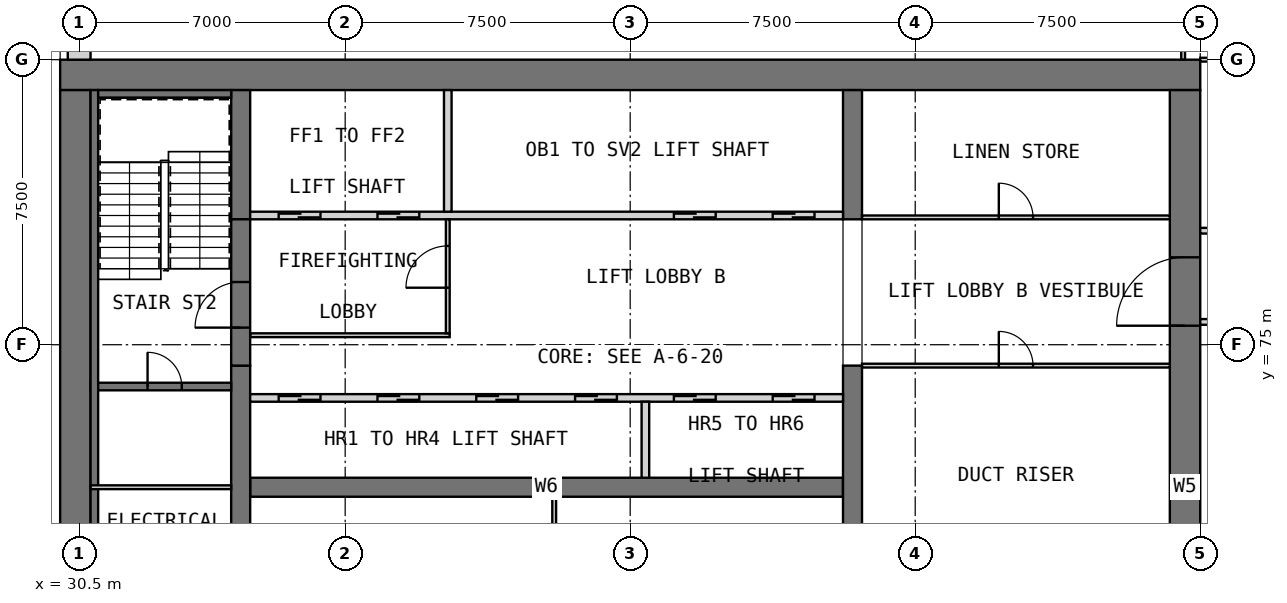
"""IFC4 building model, lengths in metres.
Left out: names, types, materials, properties, quantities, classifications, styles, units other than length and angle.
Written with IfcOpenShell. Run it as: python <this file> out.ifc"""

import sys

from ifc_helpers import new_model, si_unit, direction, frame, frame_2d, origin, place, context, subcontext, project, spatial, rectangle, extrude, element, fill, save


model = new_model("IFC4")
c1 = context("Model", 3, precision=1e-05, world=origin(), true_north=direction((0.0, 1.0)))
c2 = subcontext(c1, "Body", "Model", "MODEL_VIEW")
j1 = project(units=[si_unit("LENGTHUNIT", "METRE"), si_unit("PLANEANGLEUNIT", "RADIAN")], contexts=[c1])
p1 = place(None, origin())
s1 = spatial("IfcSite", under=j1, at=p1, CompositionType="ELEMENT")
p2 = place(p1, origin())
s2 = spatial("IfcBuilding", under=s1, at=p2, CompositionType="ELEMENT")
p3 = place(p2, frame((0.0, 0.0, 141.0)))
s3 = spatial("IfcBuildingStorey", under=s2, at=p3, CompositionType="ELEMENT", Elevation=141.0)
p4 = place(p3, frame((30.0, 82.1, 0.0), z_axis=(0.0, 0.0, 1.0), x_axis=(1.0, 0.0, 0.0)))
e1 = element("IfcWall", 1, at=p4, inside=s3, PredefinedType="SHEAR", context=c2, shape_type="SweptSolid", body=[
    extrude(rectangle(XDim=30.0, YDim=0.8, at=frame_2d((15.0, 0.0))), origin(), (0.0, 0.0, 1.0), 3.6),
])
p5 = place(p3, frame((30.4, 60.8, 0.0), z_axis=(0.0, 0.0, 1.0), x_axis=(0.0, 1.0, 0.0)))
e2 = element("IfcWall", 2, at=p5, inside=s3, PredefinedType="SHEAR", context=c2, shape_type="SweptSolid", body=[
    extrude(rectangle(XDim=20.9, YDim=0.8, at=frame_2d((10.45, 0.0))), origin(), (0.0, 0.0, 1.0), 3.6),
])
p6 = place(p3, frame((59.6, 60.8, 0.0), z_axis=(0.0, 0.0, 1.0), x_axis=(0.0, 1.0, 0.0)))
e3 = element("IfcWall", 3, at=p6, inside=s3, PredefinedType="SHEAR", context=c2, shape_type="SweptSolid", body=[
    extrude(rectangle(XDim=20.9, YDim=0.8, at=frame_2d((10.45, 0.0))), origin(), (0.0, 0.0, 1.0), 3.6),
])
p7 = place(p6, frame((14.7, 0.0, 0.0)))
e4 = element("IfcOpeningElement", 4, at=p7, cuts=e3, PredefinedType="OPENING", context=c2, shape_type="SweptSolid", body=[
    extrude(rectangle(XDim=1.8, YDim=2.1, at=frame_2d((0.9, 1.05))), frame((0.0, 0.41, 0.0), z_axis=(0.0, -1.0, 0.0), x_axis=(1.0, 0.0, 0.0)), (0.0, 0.0, 1.0), 0.82),
])
p8 = place(p3, frame((35.0, 71.25, 0.0), z_axis=(0.0, 0.0, 1.0), x_axis=(1.0, 0.0, 0.0)))
e5 = element("IfcWall", 5, at=p8, inside=s3, PredefinedType="SHEAR", context=c2, shape_type="SweptSolid", body=[
    extrude(rectangle(XDim=15.6, YDim=0.5, at=frame_2d((7.8, 0.0))), origin(), (0.0, 0.0, 1.0), 3.6),
])
p9 = place(p3, frame((34.75, 68.05, 0.0), z_axis=(0.0, 0.0, 1.0), x_axis=(0.0, 1.0, 0.0)))
e6 = element("IfcWall", 6, at=p9, inside=s3, PredefinedType="SHEAR", context=c2, shape_type="SweptSolid", body=[
    extrude(rectangle(XDim=6.4, YDim=0.5, at=frame_2d((3.2, 0.0))), origin(), (0.0, 0.0, 1.0), 3.6),
])
p10 = place(p3, frame((34.75, 78.3, 0.0), z_axis=(0.0, 0.0, 1.0), x_axis=(0.0, 1.0, 0.0)))
e7 = element("IfcWall", 7, at=p10, inside=s3, PredefinedType="SHEAR", context=c2, shape_type="SweptSolid", body=[
    extrude(rectangle(XDim=3.4, YDim=0.5, at=frame_2d((1.7, 0.0))), origin(), (0.0, 0.0, 1.0), 3.6),
])
p11 = place(p3, frame((50.85, 68.05, 0.0), z_axis=(0.0, 0.0, 1.0), x_axis=(0.0, 1.0, 0.0)))
e8 = element("IfcWall", 8, at=p11, inside=s3, PredefinedType="SHEAR", context=c2, shape_type="SweptSolid", body=[
    extrude(rectangle(XDim=6.4, YDim=0.5, at=frame_2d((3.2, 0.0))), origin(), (0.0, 0.0, 1.0), 3.6),
])
p12 = place(p3, frame((50.85, 78.3, 0.0), z_axis=(0.0, 0.0, 1.0), x_axis=(0.0, 1.0, 0.0)))
e9 = element("IfcWall", 9, at=p12, inside=s3, PredefinedType="SHEAR", context=c2, shape_type="SweptSolid", body=[
    extrude(rectangle(XDim=3.4, YDim=0.5, at=frame_2d((1.7, 0.0))), origin(), (0.0, 0.0, 1.0), 3.6),
])
p13 = place(p2, frame((0.0, 0.0, 34.0)))
s4 = spatial("IfcBuildingStorey", under=s2, at=p13, CompositionType="ELEMENT", Elevation=34.0)
for number, where, z_axis, x_axis in (
    (10, (29.7, 70.8, 0.0), (0.0, 0.0, 1.0), (0.0, 1.0, 0.0)),
    (11, (29.7, 75.675, 0.0), (0.0, 0.0, 1.0), (0.0, 1.0, 0.0)),
    (12, (29.7, 80.55, 0.0), (0.0, 0.0, 1.0), (0.0, 1.0, 0.0)),
):
    element("IfcWall", number, at=place(p13, frame(where, z_axis=z_axis, x_axis=x_axis)), inside=s4, PredefinedType="SOLIDWALL", context=c2, shape_type="SweptSolid", body=[
        extrude(rectangle(XDim=0.9, YDim=0.6, at=frame_2d((0.45, 0.0))), origin(), (0.0, 0.0, 1.0), 286.2),
    ])
p14 = place(p3, frame((30.5, 89.5, 0.0), z_axis=(0.0, 0.0, 1.0), x_axis=(0.0, -1.0, 0.0)))
e13 = element("IfcWall", 13, at=p14, inside=s3, PredefinedType="SOLIDWALL", context=c2, shape_type="SweptSolid", body=[
    extrude(rectangle(XDim=7.0, YDim=0.6, at=frame_2d((3.5, 0.0))), origin(), (0.0, 0.0, 1.0), 3.35),
])
p15 = place(p14, frame((3.925, 0.0, 0.8)))
e14 = element("IfcOpeningElement", 14, at=p15, cuts=e13, PredefinedType="OPENING", context=c2, shape_type="SweptSolid", body=[
    extrude(rectangle(XDim=2.4, YDim=1.8, at=frame_2d((1.2, 0.9))), frame((0.0, 0.31, 0.0), z_axis=(0.0, -1.0, 0.0), x_axis=(1.0, 0.0, 0.0)), (0.0, 0.0, 1.0), 0.62),
])
p16 = place(p14, frame((0.425, 0.0, 0.8)))
e15 = element("IfcOpeningElement", 15, at=p16, cuts=e13, PredefinedType="OPENING", context=c2, shape_type="SweptSolid", body=[
    extrude(rectangle(XDim=2.4, YDim=1.8, at=frame_2d((1.2, 0.9))), frame((0.0, 0.31, 0.0), z_axis=(0.0, -1.0, 0.0), x_axis=(1.0, 0.0, 0.0)), (0.0, 0.0, 1.0), 0.62),
])
p17 = place(p3, frame((43.0, 68.25, 0.0), z_axis=(0.0, 0.0, 1.0), x_axis=(0.0, 1.0, 0.0)))
e16 = element("IfcWall", 16, at=p17, inside=s3, PredefinedType="PARTITIONING", context=c2, shape_type="SweptSolid", body=[
    extrude(rectangle(XDim=2.75, YDim=0.1, at=frame_2d((1.375, 0.0))), origin(), (0.0, 0.0, 1.0), 3.35),
])
p18 = place(p3, frame((35.0, 73.6, 0.0), z_axis=(0.0, 0.0, 1.0), x_axis=(1.0, 0.0, 0.0)))
e17 = element("IfcWall", 17, at=p18, inside=s3, PredefinedType="SOLIDWALL", context=c2, shape_type="SweptSolid", body=[
    extrude(rectangle(XDim=15.6, YDim=0.2, at=frame_2d((7.8, 0.0))), origin(), (0.0, 0.0, 1.0), 3.6),
])
p19 = place(p18, frame((0.75, 0.0, 0.0)))
e18 = element("IfcOpeningElement", 18, at=p19, cuts=e17, PredefinedType="OPENING", context=c2, shape_type="SweptSolid", body=[
    extrude(rectangle(XDim=1.1, YDim=2.1, at=frame_2d((0.55, 1.05))), frame((0.0, 0.11, 0.0), z_axis=(0.0, -1.0, 0.0), x_axis=(1.0, 0.0, 0.0)), (0.0, 0.0, 1.0), 0.22),
])
p20 = place(p18, frame((3.35, 0.0, 0.0)))
e19 = element("IfcOpeningElement", 19, at=p20, cuts=e17, PredefinedType="OPENING", context=c2, shape_type="SweptSolid", body=[
    extrude(rectangle(XDim=1.1, YDim=2.1, at=frame_2d((0.55, 1.05))), frame((0.0, 0.11, 0.0), z_axis=(0.0, -1.0, 0.0), x_axis=(1.0, 0.0, 0.0)), (0.0, 0.0, 1.0), 0.22),
])
p21 = place(p18, frame((5.95, 0.0, 0.0)))
e20 = element("IfcOpeningElement", 20, at=p21, cuts=e17, PredefinedType="OPENING", context=c2, shape_type="SweptSolid", body=[
    extrude(rectangle(XDim=1.1, YDim=2.1, at=frame_2d((0.55, 1.05))), frame((0.0, 0.11, 0.0), z_axis=(0.0, -1.0, 0.0), x_axis=(1.0, 0.0, 0.0)), (0.0, 0.0, 1.0), 0.22),
])
p22 = place(p18, frame((8.55, 0.0, 0.0)))
e21 = element("IfcOpeningElement", 21, at=p22, cuts=e17, PredefinedType="OPENING", context=c2, shape_type="SweptSolid", body=[
    extrude(rectangle(XDim=1.1, YDim=2.1, at=frame_2d((0.55, 1.05))), frame((0.0, 0.11, 0.0), z_axis=(0.0, -1.0, 0.0), x_axis=(1.0, 0.0, 0.0)), (0.0, 0.0, 1.0), 0.22),
])
p23 = place(p18, frame((11.15, 0.0, 0.0)))
e22 = element("IfcOpeningElement", 22, at=p23, cuts=e17, PredefinedType="OPENING", context=c2, shape_type="SweptSolid", body=[
    extrude(rectangle(XDim=1.1, YDim=2.1, at=frame_2d((0.55, 1.05))), frame((0.0, 0.11, 0.0), z_axis=(0.0, -1.0, 0.0), x_axis=(1.0, 0.0, 0.0)), (0.0, 0.0, 1.0), 0.22),
])
p24 = place(p18, frame((13.75, 0.0, 0.0)))
e23 = element("IfcOpeningElement", 23, at=p24, cuts=e17, PredefinedType="OPENING", context=c2, shape_type="SweptSolid", body=[
    extrude(rectangle(XDim=1.1, YDim=2.1, at=frame_2d((0.55, 1.05))), frame((0.0, 0.11, 0.0), z_axis=(0.0, -1.0, 0.0), x_axis=(1.0, 0.0, 0.0)), (0.0, 0.0, 1.0), 0.22),
])
p25 = place(p3, frame((45.4, 71.5, 0.0), z_axis=(0.0, 0.0, 1.0), x_axis=(0.0, 1.0, 0.0)))
e24 = element("IfcWall", 24, at=p25, inside=s3, PredefinedType="SOLIDWALL", context=c2, shape_type="SweptSolid", body=[
    extrude(rectangle(XDim=2.0, YDim=0.2, at=frame_2d((1.0, 0.0))), origin(), (0.0, 0.0, 1.0), 3.6),
])
p26 = place(p3, frame((35.0, 78.4, 0.0), z_axis=(0.0, 0.0, 1.0), x_axis=(1.0, 0.0, 0.0)))
e25 = element("IfcWall", 25, at=p26, inside=s3, PredefinedType="SOLIDWALL", context=c2, shape_type="SweptSolid", body=[
    extrude(rectangle(XDim=15.6, YDim=0.2, at=frame_2d((7.8, 0.0))), origin(), (0.0, 0.0, 1.0), 3.6),
])
p27 = place(p26, frame((0.75, 0.0, 0.0)))
e26 = element("IfcOpeningElement", 26, at=p27, cuts=e25, PredefinedType="OPENING", context=c2, shape_type="SweptSolid", body=[
    extrude(rectangle(XDim=1.1, YDim=2.1, at=frame_2d((0.55, 1.05))), frame((0.0, 0.11, 0.0), z_axis=(0.0, -1.0, 0.0), x_axis=(1.0, 0.0, 0.0)), (0.0, 0.0, 1.0), 0.22),
])
p28 = place(p26, frame((3.35, 0.0, 0.0)))
e27 = element("IfcOpeningElement", 27, at=p28, cuts=e25, PredefinedType="OPENING", context=c2, shape_type="SweptSolid", body=[
    extrude(rectangle(XDim=1.1, YDim=2.1, at=frame_2d((0.55, 1.05))), frame((0.0, 0.11, 0.0), z_axis=(0.0, -1.0, 0.0), x_axis=(1.0, 0.0, 0.0)), (0.0, 0.0, 1.0), 0.22),
])
p29 = place(p26, frame((11.15, 0.0, 0.0)))
e28 = element("IfcOpeningElement", 28, at=p29, cuts=e25, PredefinedType="OPENING", context=c2, shape_type="SweptSolid", body=[
    extrude(rectangle(XDim=1.1, YDim=2.1, at=frame_2d((0.55, 1.05))), frame((0.0, 0.11, 0.0), z_axis=(0.0, -1.0, 0.0), x_axis=(1.0, 0.0, 0.0)), (0.0, 0.0, 1.0), 0.22),
])
p30 = place(p26, frame((13.75, 0.0, 0.0)))
e29 = element("IfcOpeningElement", 29, at=p30, cuts=e25, PredefinedType="OPENING", context=c2, shape_type="SweptSolid", body=[
    extrude(rectangle(XDim=1.1, YDim=2.1, at=frame_2d((0.55, 1.05))), frame((0.0, 0.11, 0.0), z_axis=(0.0, -1.0, 0.0), x_axis=(1.0, 0.0, 0.0)), (0.0, 0.0, 1.0), 0.22),
])
p31 = place(p3, frame((40.2, 78.5, 0.0), z_axis=(0.0, 0.0, 1.0), x_axis=(0.0, 1.0, 0.0)))
e30 = element("IfcWall", 30, at=p31, inside=s3, PredefinedType="SOLIDWALL", context=c2, shape_type="SweptSolid", body=[
    extrude(rectangle(XDim=3.2, YDim=0.2, at=frame_2d((1.6, 0.0))), origin(), (0.0, 0.0, 1.0), 3.6),
])
p32 = place(p3, frame((35.0, 75.25, 0.0), z_axis=(0.0, 0.0, 1.0), x_axis=(1.0, 0.0, 0.0)))
e31 = element("IfcWall", 31, at=p32, inside=s3, PredefinedType="PARTITIONING", context=c2, shape_type="SweptSolid", body=[
    extrude(rectangle(XDim=5.25, YDim=0.1, at=frame_2d((2.625, 0.0))), origin(), (0.0, 0.0, 1.0), 3.35),
])
p33 = place(p3, frame((40.2, 75.3, 0.0), z_axis=(0.0, 0.0, 1.0), x_axis=(0.0, 1.0, 0.0)))
e32 = element("IfcWall", 32, at=p33, inside=s3, PredefinedType="PARTITIONING", context=c2, shape_type="SweptSolid", body=[
    extrude(rectangle(XDim=3.0, YDim=0.1, at=frame_2d((1.5, 0.0))), origin(), (0.0, 0.0, 1.0), 3.35),
])
p34 = place(p33, frame((1.2, 0.0, 0.0)))
e33 = element("IfcOpeningElement", 33, at=p34, cuts=e32, PredefinedType="OPENING", context=c2, shape_type="SweptSolid", body=[
    extrude(rectangle(XDim=1.1, YDim=2.1, at=frame_2d((0.55, 1.05))), frame((0.0, 0.06, 0.0), z_axis=(0.0, -1.0, 0.0), x_axis=(1.0, 0.0, 0.0)), (0.0, 0.0, 1.0), 0.12),
])
p35 = place(p3, frame((34.75, 74.45, 0.0), z_axis=(0.0, 0.0, 1.0), x_axis=(0.0, 1.0, 0.0)))
e34 = element("IfcWall", 34, at=p35, inside=s3, PredefinedType="SOLIDWALL", context=c2, shape_type="SweptSolid", body=[
    extrude(rectangle(XDim=3.85, YDim=0.5, at=frame_2d((1.925, 0.0))), origin(), (0.0, 0.0, 1.0), 2.4),
])
p36 = place(p35, frame((1.0, 0.0, 0.0)))
e35 = element("IfcOpeningElement", 35, at=p36, cuts=e34, PredefinedType="OPENING", context=c2, shape_type="SweptSolid", body=[
    extrude(rectangle(XDim=1.2, YDim=2.1, at=frame_2d((0.6, 1.05))), frame((0.0, 0.26, 0.0), z_axis=(0.0, -1.0, 0.0), x_axis=(1.0, 0.0, 0.0)), (0.0, 0.0, 1.0), 0.52),
])
p37 = place(p3, frame((30.8, 73.9, 0.0), z_axis=(0.0, 0.0, 1.0), x_axis=(1.0, 0.0, 0.0)))
e36 = element("IfcWall", 36, at=p37, inside=s3, PredefinedType="SOLIDWALL", context=c2, shape_type="SweptSolid", body=[
    extrude(rectangle(XDim=3.7, YDim=0.2, at=frame_2d((1.85, 0.0))), origin(), (0.0, 0.0, 1.0), 3.35),
])
p38 = place(p37, frame((1.5, 0.0, 0.0)))
e37 = element("IfcOpeningElement", 37, at=p38, cuts=e36, PredefinedType="OPENING", context=c2, shape_type="SweptSolid", body=[
    extrude(rectangle(XDim=0.9, YDim=2.1, at=frame_2d((0.45, 1.05))), frame((0.0, 0.11, 0.0), z_axis=(0.0, -1.0, 0.0), x_axis=(1.0, 0.0, 0.0)), (0.0, 0.0, 1.0), 0.22),
])
p39 = place(p3, frame((30.9, 60.8, 0.0), z_axis=(0.0, 0.0, 1.0), x_axis=(0.0, 1.0, 0.0)))
e38 = element("IfcWall", 38, at=p39, inside=s3, PredefinedType="SOLIDWALL", context=c2, shape_type="SweptSolid", body=[
    extrude(rectangle(XDim=20.9, YDim=0.2, at=frame_2d((10.45, 0.0))), origin(), (0.0, 0.0, 1.0), 3.35),
])
p40 = place(p3, frame((31.0, 81.6, 0.0), z_axis=(0.0, 0.0, 1.0), x_axis=(1.0, 0.0, 0.0)))
e39 = element("IfcWall", 39, at=p40, inside=s3, PredefinedType="SOLIDWALL", context=c2, shape_type="SweptSolid", body=[
    extrude(rectangle(XDim=3.5, YDim=0.2, at=frame_2d((1.75, 0.0))), origin(), (0.0, 0.0, 1.0), 3.35),
])
p41 = place(p3, frame((30.8, 71.25, 0.0), z_axis=(0.0, 0.0, 1.0), x_axis=(1.0, 0.0, 0.0)))
e40 = element("IfcWall", 40, at=p41, inside=s3, PredefinedType="PARTITIONING", context=c2, shape_type="SweptSolid", body=[
    extrude(rectangle(XDim=3.7, YDim=0.1, at=frame_2d((1.85, 0.0))), origin(), (0.0, 0.0, 1.0), 3.35),
])
p42 = place(p3, frame((51.1, 74.45, 0.0), z_axis=(0.0, 0.0, 1.0), x_axis=(1.0, 0.0, 0.0)))
e41 = element("IfcWall", 41, at=p42, inside=s3, PredefinedType="PARTITIONING", context=c2, shape_type="SweptSolid", body=[
    extrude(rectangle(XDim=8.1, YDim=0.1, at=frame_2d((4.05, 0.0))), origin(), (0.0, 0.0, 1.0), 3.35),
])
p43 = place(p42, frame((3.6, 0.0, 0.0)))
e42 = element("IfcOpeningElement", 42, at=p43, cuts=e41, PredefinedType="OPENING", context=c2, shape_type="SweptSolid", body=[
    extrude(rectangle(XDim=0.9, YDim=2.1, at=frame_2d((0.45, 1.05))), frame((0.0, 0.06, 0.0), z_axis=(0.0, -1.0, 0.0), x_axis=(1.0, 0.0, 0.0)), (0.0, 0.0, 1.0), 0.12),
])
p44 = place(p3, frame((51.1, 78.35, 0.0), z_axis=(0.0, 0.0, 1.0), x_axis=(1.0, 0.0, 0.0)))
e43 = element("IfcWall", 43, at=p44, inside=s3, PredefinedType="PARTITIONING", context=c2, shape_type="SweptSolid", body=[
    extrude(rectangle(XDim=8.1, YDim=0.1, at=frame_2d((4.05, 0.0))), origin(), (0.0, 0.0, 1.0), 3.35),
])
p45 = place(p44, frame((3.6, 0.0, 0.0)))
e44 = element("IfcOpeningElement", 44, at=p45, cuts=e43, PredefinedType="OPENING", context=c2, shape_type="SweptSolid", body=[
    extrude(rectangle(XDim=0.9, YDim=2.1, at=frame_2d((0.45, 1.05))), frame((0.0, 0.06, 0.0), z_axis=(0.0, -1.0, 0.0), x_axis=(1.0, 0.0, 0.0)), (0.0, 0.0, 1.0), 0.12),
])
p46 = place(p3, frame((60.0, 82.5, 0.0), z_axis=(0.0, 0.0, 1.0), x_axis=(1.0, 0.0, 0.0)))
e45 = element("IfcWall", 45, at=p46, inside=s3, PredefinedType="PARTITIONING", context=c2, shape_type="SweptSolid", body=[
    extrude(rectangle(XDim=11.175, YDim=0.1, at=frame_2d((5.587, 0.0))), origin(), (0.0, 0.0, 1.0), 3.35),
])
p47 = place(p3, frame((59.55, 82.5, 0.0), z_axis=(0.0, 0.0, 1.0), x_axis=(0.0, 1.0, 0.0)))
e46 = element("IfcWall", 46, at=p47, inside=s3, PredefinedType="PARTITIONING", context=c2, shape_type="SweptSolid", body=[
    extrude(rectangle(XDim=3.675, YDim=0.1, at=frame_2d((1.837, 0.0))), origin(), (0.0, 0.0, 1.0), 3.35),
])
for number, where, z_axis, x_axis in (
    (47, (60.0, 75.6, 0.0), (0.0, 0.0, 1.0), (1.0, 0.0, 0.0)),
    (48, (60.0, 78.0, 0.0), (0.0, 0.0, 1.0), (1.0, 0.0, 0.0)),
):
    element("IfcWall", number, at=place(p3, frame(where, z_axis=z_axis, x_axis=x_axis)), inside=s3, PredefinedType="PARTITIONING", context=c2, shape_type="SweptSolid", body=[
        extrude(rectangle(XDim=11.25, YDim=0.15, at=frame_2d((5.625, 0.0))), origin(), (0.0, 0.0, 1.0), 3.35),
    ])
p48 = place(p19, origin())
e49 = element("IfcDoor", 49, at=p48, inside=s3, OperationType="DOUBLE_DOOR_SLIDING", PredefinedType="DOOR", context=c2, shape_type="SweptSolid", body=[
    extrude(rectangle(XDim=1.1, YDim=2.1, at=frame_2d((0.55, 1.05))), frame((0.0, 0.025, 0.0), z_axis=(0.0, -1.0, 0.0), x_axis=(1.0, 0.0, 0.0)), (0.0, 0.0, 1.0), 0.05),
])
fill(e18, e49)
p49 = place(p20, origin())
e50 = element("IfcDoor", 50, at=p49, inside=s3, OperationType="DOUBLE_DOOR_SLIDING", PredefinedType="DOOR", context=c2, shape_type="SweptSolid", body=[
    extrude(rectangle(XDim=1.1, YDim=2.1, at=frame_2d((0.55, 1.05))), frame((0.0, 0.025, 0.0), z_axis=(0.0, -1.0, 0.0), x_axis=(1.0, 0.0, 0.0)), (0.0, 0.0, 1.0), 0.05),
])
fill(e19, e50)
p50 = place(p21, origin())
e51 = element("IfcDoor", 51, at=p50, inside=s3, OperationType="DOUBLE_DOOR_SLIDING", PredefinedType="DOOR", context=c2, shape_type="SweptSolid", body=[
    extrude(rectangle(XDim=1.1, YDim=2.1, at=frame_2d((0.55, 1.05))), frame((0.0, 0.025, 0.0), z_axis=(0.0, -1.0, 0.0), x_axis=(1.0, 0.0, 0.0)), (0.0, 0.0, 1.0), 0.05),
])
fill(e20, e51)
p51 = place(p22, origin())
e52 = element("IfcDoor", 52, at=p51, inside=s3, OperationType="DOUBLE_DOOR_SLIDING", PredefinedType="DOOR", context=c2, shape_type="SweptSolid", body=[
    extrude(rectangle(XDim=1.1, YDim=2.1, at=frame_2d((0.55, 1.05))), frame((0.0, 0.025, 0.0), z_axis=(0.0, -1.0, 0.0), x_axis=(1.0, 0.0, 0.0)), (0.0, 0.0, 1.0), 0.05),
])
fill(e21, e52)
p52 = place(p23, origin())
e53 = element("IfcDoor", 53, at=p52, inside=s3, OperationType="DOUBLE_DOOR_SLIDING", PredefinedType="DOOR", context=c2, shape_type="SweptSolid", body=[
    extrude(rectangle(XDim=1.1, YDim=2.1, at=frame_2d((0.55, 1.05))), frame((0.0, 0.025, 0.0), z_axis=(0.0, -1.0, 0.0), x_axis=(1.0, 0.0, 0.0)), (0.0, 0.0, 1.0), 0.05),
])
fill(e22, e53)
p53 = place(p24, origin())
e54 = element("IfcDoor", 54, at=p53, inside=s3, OperationType="DOUBLE_DOOR_SLIDING", PredefinedType="DOOR", context=c2, shape_type="SweptSolid", body=[
    extrude(rectangle(XDim=1.1, YDim=2.1, at=frame_2d((0.55, 1.05))), frame((0.0, 0.025, 0.0), z_axis=(0.0, -1.0, 0.0), x_axis=(1.0, 0.0, 0.0)), (0.0, 0.0, 1.0), 0.05),
])
fill(e23, e54)
p54 = place(p27, origin())
e55 = element("IfcDoor", 55, at=p54, inside=s3, OperationType="DOUBLE_DOOR_SLIDING", PredefinedType="DOOR", context=c2, shape_type="SweptSolid", body=[
    extrude(rectangle(XDim=1.1, YDim=2.1, at=frame_2d((0.55, 1.05))), frame((0.0, 0.025, 0.0), z_axis=(0.0, -1.0, 0.0), x_axis=(1.0, 0.0, 0.0)), (0.0, 0.0, 1.0), 0.05),
])
fill(e26, e55)
p55 = place(p28, origin())
e56 = element("IfcDoor", 56, at=p55, inside=s3, OperationType="DOUBLE_DOOR_SLIDING", PredefinedType="DOOR", context=c2, shape_type="SweptSolid", body=[
    extrude(rectangle(XDim=1.1, YDim=2.1, at=frame_2d((0.55, 1.05))), frame((0.0, 0.025, 0.0), z_axis=(0.0, -1.0, 0.0), x_axis=(1.0, 0.0, 0.0)), (0.0, 0.0, 1.0), 0.05),
])
fill(e27, e56)
p56 = place(p29, origin())
e57 = element("IfcDoor", 57, at=p56, inside=s3, OperationType="DOUBLE_DOOR_SLIDING", PredefinedType="DOOR", context=c2, shape_type="SweptSolid", body=[
    extrude(rectangle(XDim=1.1, YDim=2.1, at=frame_2d((0.55, 1.05))), frame((0.0, 0.025, 0.0), z_axis=(0.0, -1.0, 0.0), x_axis=(1.0, 0.0, 0.0)), (0.0, 0.0, 1.0), 0.05),
])
fill(e28, e57)
p57 = place(p30, origin())
e58 = element("IfcDoor", 58, at=p57, inside=s3, OperationType="DOUBLE_DOOR_SLIDING", PredefinedType="DOOR", context=c2, shape_type="SweptSolid", body=[
    extrude(rectangle(XDim=1.1, YDim=2.1, at=frame_2d((0.55, 1.05))), frame((0.0, 0.025, 0.0), z_axis=(0.0, -1.0, 0.0), x_axis=(1.0, 0.0, 0.0)), (0.0, 0.0, 1.0), 0.05),
])
fill(e29, e58)
p58 = place(p7, origin())
e59 = element("IfcDoor", 59, at=p58, inside=s3, OperationType="DOUBLE_DOOR_SINGLE_SWING", PredefinedType="DOOR", context=c2, shape_type="SweptSolid", body=[
    extrude(rectangle(XDim=1.8, YDim=2.1, at=frame_2d((0.9, 1.05))), frame((0.0, 0.025, 0.0), z_axis=(0.0, -1.0, 0.0), x_axis=(1.0, 0.0, 0.0)), (0.0, 0.0, 1.0), 0.05),
])
fill(e4, e59)
p59 = place(p34, origin())
e60 = element("IfcDoor", 60, at=p59, inside=s3, OperationType="SINGLE_SWING_LEFT", PredefinedType="DOOR", context=c2, shape_type="SweptSolid", body=[
    extrude(rectangle(XDim=1.1, YDim=2.1, at=frame_2d((0.55, 1.05))), frame((0.0, 0.025, 0.0), z_axis=(0.0, -1.0, 0.0), x_axis=(1.0, 0.0, 0.0)), (0.0, 0.0, 1.0), 0.05),
])
fill(e33, e60)
p60 = place(p36, origin())
e61 = element("IfcDoor", 61, at=p60, inside=s3, OperationType="SINGLE_SWING_RIGHT", PredefinedType="DOOR", context=c2, shape_type="SweptSolid", body=[
    extrude(rectangle(XDim=1.2, YDim=2.1, at=frame_2d((0.6, 1.05))), frame((0.0, 0.025, 0.0), z_axis=(0.0, -1.0, 0.0), x_axis=(1.0, 0.0, 0.0)), (0.0, 0.0, 1.0), 0.05),
])
fill(e35, e61)
p61 = place(p38, origin())
e62 = element("IfcDoor", 62, at=p61, inside=s3, OperationType="SINGLE_SWING_RIGHT", PredefinedType="DOOR", context=c2, shape_type="SweptSolid", body=[
    extrude(rectangle(XDim=0.9, YDim=2.1, at=frame_2d((0.45, 1.05))), frame((0.0, 0.025, 0.0), z_axis=(0.0, -1.0, 0.0), x_axis=(1.0, 0.0, 0.0)), (0.0, 0.0, 1.0), 0.05),
])
fill(e37, e62)
p62 = place(p43, origin())
e63 = element("IfcDoor", 63, at=p62, inside=s3, OperationType="SINGLE_SWING_RIGHT", PredefinedType="DOOR", context=c2, shape_type="SweptSolid", body=[
    extrude(rectangle(XDim=0.9, YDim=2.1, at=frame_2d((0.45, 1.05))), frame((0.0, 0.025, 0.0), z_axis=(0.0, -1.0, 0.0), x_axis=(1.0, 0.0, 0.0)), (0.0, 0.0, 1.0), 0.05),
])
fill(e42, e63)
p63 = place(p45, origin())
e64 = element("IfcDoor", 64, at=p63, inside=s3, OperationType="SINGLE_SWING_RIGHT", PredefinedType="DOOR", context=c2, shape_type="SweptSolid", body=[
    extrude(rectangle(XDim=0.9, YDim=2.1, at=frame_2d((0.45, 1.05))), frame((0.0, 0.025, 0.0), z_axis=(0.0, -1.0, 0.0), x_axis=(1.0, 0.0, 0.0)), (0.0, 0.0, 1.0), 0.05),
])
fill(e44, e64)
save(model, sys.argv[1])
